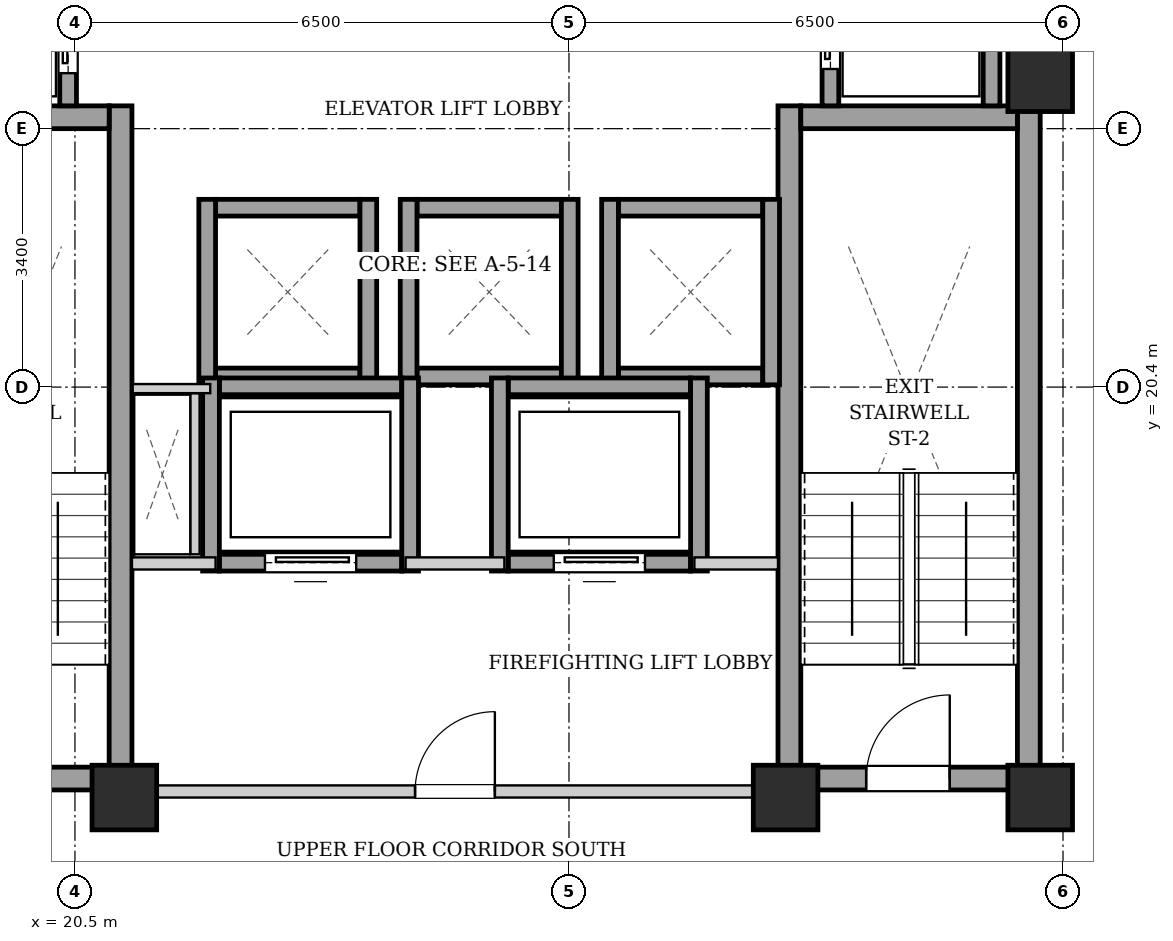
"""IFC4 building model, lengths in metres.
Left out: names, types, materials, properties, quantities, classifications, styles, units other than length and angle.
Written with IfcOpenShell. Run it as: python <this file> out.ifc"""

import sys

from ifc_helpers import new_model, si_unit, direction, frame, frame_2d, origin, origin_2d, place, context, subcontext, project, spatial, rectangle, extrude, element, fill, save


model = new_model("IFC4")
c1 = context("Model", 3, precision=1e-05, world=origin(), true_north=direction((0.0, 1.0)))
c2 = subcontext(c1, "Body", "Model", "MODEL_VIEW")
j1 = project(units=[si_unit("LENGTHUNIT", "METRE"), si_unit("PLANEANGLEUNIT", "RADIAN")], contexts=[c1])
p1 = place(None, origin())
s1 = spatial("IfcSite", under=j1, at=p1, CompositionType="ELEMENT")
p2 = place(p1, origin())
s2 = spatial("IfcBuilding", under=s1, at=p2, CompositionType="ELEMENT")
p3 = place(p2, frame((0.0, 0.0, 177.7)))
s3 = spatial("IfcBuildingStorey", under=s2, at=p3, CompositionType="ELEMENT", Elevation=177.7)
for number, where, z_axis, x_axis in (
    (1, (21.15, 15.0, 0.0), (0.0, 0.0, 1.0), (1.0, 0.0, 0.0)),
    (2, (29.85, 15.0, 0.0), (0.0, 0.0, 1.0), (1.0, 0.0, 0.0)),
    (3, (33.2, 15.0, 0.0), (0.0, 0.0, 1.0), (1.0, 0.0, 0.0)),
    (4, (33.2, 24.45, 0.0), (0.0, 0.0, 1.0), (1.0, 0.0, 0.0)),
):
    element("IfcColumn", number, at=place(p3, frame(where, z_axis=z_axis, x_axis=x_axis)), inside=s3, PredefinedType="COLUMN", context=c2, shape_type="SweptSolid", body=[
        extrude(rectangle(XDim=0.85, YDim=0.85, at=origin_2d()), origin(), (0.0, 0.0, 1.0), 3.3),
    ])
p4 = place(p3, frame((21.1, 15.1, 0.0), z_axis=(0.0, 0.0, 1.0), x_axis=(0.0, 1.0, 0.0)))
e5 = element("IfcWall", 5, at=p4, inside=s3, PredefinedType="SHEAR", context=c2, shape_type="SweptSolid", body=[
    extrude(rectangle(XDim=9.0, YDim=0.3, at=frame_2d((4.5, 0.0))), origin(), (0.0, 0.0, 1.0), 3.04),
])
p5 = place(p3, frame((18.1, 23.95, 0.0), z_axis=(0.0, 0.0, 1.0), x_axis=(1.0, 0.0, 0.0)))
e6 = element("IfcWall", 6, at=p5, inside=s3, PredefinedType="SHEAR", context=c2, shape_type="SweptSolid", body=[
    extrude(rectangle(XDim=2.85, YDim=0.3, at=frame_2d((1.425, 0.0))), origin(), (0.0, 0.0, 1.0), 3.04),
])
p6 = place(p3, frame((18.1, 15.25, 0.0), z_axis=(0.0, 0.0, 1.0), x_axis=(1.0, 0.0, 0.0)))
e7 = element("IfcWall", 7, at=p6, inside=s3, PredefinedType="SHEAR", context=c2, shape_type="SweptSolid", body=[
    extrude(rectangle(XDim=2.85, YDim=0.3, at=frame_2d((1.425, 0.0))), origin(), (0.0, 0.0, 1.0), 3.04),
])
p7 = place(p6, frame((0.86, 0.0, 0.0)))
e8 = element("IfcOpeningElement", 8, at=p7, cuts=e7, PredefinedType="OPENING", context=c2, shape_type="SweptSolid", body=[
    extrude(rectangle(XDim=1.1, YDim=2.05, at=frame_2d((0.55, 1.025))), frame((0.0, 0.16, 0.0), z_axis=(0.0, -1.0, 0.0), x_axis=(1.0, 0.0, 0.0)), (0.0, 0.0, 1.0), 0.32),
])
for number, where, z_axis, x_axis in (
    (9, (29.9, 15.1, 0.0), (0.0, 0.0, 1.0), (0.0, 1.0, 0.0)),
    (10, (33.05, 15.1, 0.0), (0.0, 0.0, 1.0), (0.0, 1.0, 0.0)),
):
    element("IfcWall", number, at=place(p3, frame(where, z_axis=z_axis, x_axis=x_axis)), inside=s3, PredefinedType="SHEAR", context=c2, shape_type="SweptSolid", body=[
        extrude(rectangle(XDim=9.0, YDim=0.3, at=frame_2d((4.5, 0.0))), origin(), (0.0, 0.0, 1.0), 3.04),
    ])
p8 = place(p3, frame((30.05, 23.95, 0.0), z_axis=(0.0, 0.0, 1.0), x_axis=(1.0, 0.0, 0.0)))
e11 = element("IfcWall", 11, at=p8, inside=s3, PredefinedType="SHEAR", context=c2, shape_type="SweptSolid", body=[
    extrude(rectangle(XDim=2.85, YDim=0.3, at=frame_2d((1.425, 0.0))), origin(), (0.0, 0.0, 1.0), 3.04),
])
p9 = place(p3, frame((30.05, 15.25, 0.0), z_axis=(0.0, 0.0, 1.0), x_axis=(1.0, 0.0, 0.0)))
e12 = element("IfcWall", 12, at=p9, inside=s3, PredefinedType="SHEAR", context=c2, shape_type="SweptSolid", body=[
    extrude(rectangle(XDim=2.85, YDim=0.3, at=frame_2d((1.425, 0.0))), origin(), (0.0, 0.0, 1.0), 3.04),
])
p10 = place(p9, frame((0.86, 0.0, 0.0)))
e13 = element("IfcOpeningElement", 13, at=p10, cuts=e12, PredefinedType="OPENING", context=c2, shape_type="SweptSolid", body=[
    extrude(rectangle(XDim=1.1, YDim=2.05, at=frame_2d((0.55, 1.025))), frame((0.0, 0.16, 0.0), z_axis=(0.0, -1.0, 0.0), x_axis=(1.0, 0.0, 0.0)), (0.0, 0.0, 1.0), 0.32),
])
for number, where, z_axis, x_axis in (
    (14, (22.35, 20.54, 0.0), (0.0, 0.0, 1.0), (1.0, 0.0, 0.0)),
    (15, (22.35, 22.76, 0.0), (0.0, 0.0, 1.0), (1.0, 0.0, 0.0)),
):
    element("IfcWall", number, at=place(p3, frame(where, z_axis=z_axis, x_axis=x_axis)), inside=s3, PredefinedType="SHEAR", context=c2, shape_type="SweptSolid", body=[
        extrude(rectangle(XDim=1.9, YDim=0.22, at=frame_2d((0.95, 0.0))), origin(), (0.0, 0.0, 1.0), 3.04),
    ])
for number, where, z_axis, x_axis in (
    (16, (22.24, 20.43, 0.0), (0.0, 0.0, 1.0), (0.0, 1.0, 0.0)),
    (17, (24.36, 20.43, 0.0), (0.0, 0.0, 1.0), (0.0, 1.0, 0.0)),
):
    element("IfcWall", number, at=place(p3, frame(where, z_axis=z_axis, x_axis=x_axis)), inside=s3, PredefinedType="SHEAR", context=c2, shape_type="SweptSolid", body=[
        extrude(rectangle(XDim=2.44, YDim=0.22, at=frame_2d((1.22, 0.0))), origin(), (0.0, 0.0, 1.0), 3.04),
    ])
for number, where, z_axis, x_axis in (
    (18, (25.0, 20.54, 0.0), (0.0, 0.0, 1.0), (1.0, 0.0, 0.0)),
    (19, (25.0, 22.76, 0.0), (0.0, 0.0, 1.0), (1.0, 0.0, 0.0)),
):
    element("IfcWall", number, at=place(p3, frame(where, z_axis=z_axis, x_axis=x_axis)), inside=s3, PredefinedType="SHEAR", context=c2, shape_type="SweptSolid", body=[
        extrude(rectangle(XDim=1.9, YDim=0.22, at=frame_2d((0.95, 0.0))), origin(), (0.0, 0.0, 1.0), 3.04),
    ])
for number, where, z_axis, x_axis in (
    (20, (24.89, 20.43, 0.0), (0.0, 0.0, 1.0), (0.0, 1.0, 0.0)),
    (21, (27.01, 20.43, 0.0), (0.0, 0.0, 1.0), (0.0, 1.0, 0.0)),
):
    element("IfcWall", number, at=place(p3, frame(where, z_axis=z_axis, x_axis=x_axis)), inside=s3, PredefinedType="SHEAR", context=c2, shape_type="SweptSolid", body=[
        extrude(rectangle(XDim=2.44, YDim=0.22, at=frame_2d((1.22, 0.0))), origin(), (0.0, 0.0, 1.0), 3.04),
    ])
for number, where, z_axis, x_axis in (
    (22, (27.65, 20.54, 0.0), (0.0, 0.0, 1.0), (1.0, 0.0, 0.0)),
    (23, (27.65, 22.76, 0.0), (0.0, 0.0, 1.0), (1.0, 0.0, 0.0)),
):
    element("IfcWall", number, at=place(p3, frame(where, z_axis=z_axis, x_axis=x_axis)), inside=s3, PredefinedType="SHEAR", context=c2, shape_type="SweptSolid", body=[
        extrude(rectangle(XDim=1.9, YDim=0.22, at=frame_2d((0.95, 0.0))), origin(), (0.0, 0.0, 1.0), 3.04),
    ])
for number, where, z_axis, x_axis in (
    (24, (27.54, 20.43, 0.0), (0.0, 0.0, 1.0), (0.0, 1.0, 0.0)),
    (25, (29.66, 20.43, 0.0), (0.0, 0.0, 1.0), (0.0, 1.0, 0.0)),
):
    element("IfcWall", number, at=place(p3, frame(where, z_axis=z_axis, x_axis=x_axis)), inside=s3, PredefinedType="SHEAR", context=c2, shape_type="SweptSolid", body=[
        extrude(rectangle(XDim=2.44, YDim=0.22, at=frame_2d((1.22, 0.0))), origin(), (0.0, 0.0, 1.0), 3.04),
    ])
p11 = place(p3, frame((20.41, 24.1, 0.0), z_axis=(0.0, 0.0, 1.0), x_axis=(0.0, 1.0, 0.0)))
e26 = element("IfcWall", 26, at=p11, inside=s3, PredefinedType="SHEAR", context=c2, shape_type="SweptSolid", body=[
    extrude(rectangle(XDim=1.96, YDim=0.22, at=frame_2d((0.98, 0.0))), origin(), (0.0, 0.0, 1.0), 3.04),
])
p12 = place(p11, frame((0.43, 0.0, 0.0)))
e27 = element("IfcOpeningElement", 27, at=p12, cuts=e26, PredefinedType="OPENING", context=c2, shape_type="SweptSolid", body=[
    extrude(rectangle(XDim=1.1, YDim=2.15, at=frame_2d((0.55, 1.075))), frame((0.0, 0.12, 0.0), z_axis=(0.0, -1.0, 0.0), x_axis=(1.0, 0.0, 0.0)), (0.0, 0.0, 1.0), 0.24),
])
p13 = place(p3, frame((30.44, 24.1, 0.0), z_axis=(0.0, 0.0, 1.0), x_axis=(0.0, 1.0, 0.0)))
e28 = element("IfcWall", 28, at=p13, inside=s3, PredefinedType="SHEAR", context=c2, shape_type="SweptSolid", body=[
    extrude(rectangle(XDim=2.07, YDim=0.22, at=frame_2d((1.035, 0.0))), origin(), (0.0, 0.0, 1.0), 3.04),
])
p14 = place(p13, frame((0.485, 0.0, 0.0)))
e29 = element("IfcOpeningElement", 29, at=p14, cuts=e28, PredefinedType="OPENING", context=c2, shape_type="SweptSolid", body=[
    extrude(rectangle(XDim=1.1, YDim=2.15, at=frame_2d((0.55, 1.075))), frame((0.0, 0.12, 0.0), z_axis=(0.0, -1.0, 0.0), x_axis=(1.0, 0.0, 0.0)), (0.0, 0.0, 1.0), 0.24),
])
p15 = place(p3, frame((32.56, 24.1, 0.0), z_axis=(0.0, 0.0, 1.0), x_axis=(0.0, 1.0, 0.0)))
e30 = element("IfcWall", 30, at=p15, inside=s3, PredefinedType="SHEAR", context=c2, shape_type="SweptSolid", body=[
    extrude(rectangle(XDim=2.07, YDim=0.22, at=frame_2d((1.035, 0.0))), origin(), (0.0, 0.0, 1.0), 3.04),
])
p16 = place(p3, frame((22.4, 18.09, 0.0), z_axis=(0.0, 0.0, 1.0), x_axis=(1.0, 0.0, 0.0)))
e31 = element("IfcWall", 31, at=p16, inside=s3, PredefinedType="SHEAR", context=c2, shape_type="SweptSolid", body=[
    extrude(rectangle(XDim=2.4, YDim=0.22, at=frame_2d((1.2, 0.0))), origin(), (0.0, 0.0, 1.0), 3.04),
])
p17 = place(p16, frame((0.6, 0.0, 0.0)))
e32 = element("IfcOpeningElement", 32, at=p17, cuts=e31, PredefinedType="OPENING", context=c2, shape_type="SweptSolid", body=[
    extrude(rectangle(XDim=1.2, YDim=2.15, at=frame_2d((0.6, 1.075))), frame((0.0, 0.12, 0.0), z_axis=(0.0, -1.0, 0.0), x_axis=(1.0, 0.0, 0.0)), (0.0, 0.0, 1.0), 0.24),
])
p18 = place(p3, frame((22.4, 20.41, 0.0), z_axis=(0.0, 0.0, 1.0), x_axis=(1.0, 0.0, 0.0)))
e33 = element("IfcWall", 33, at=p18, inside=s3, PredefinedType="SHEAR", context=c2, shape_type="SweptSolid", body=[
    extrude(rectangle(XDim=2.4, YDim=0.22, at=frame_2d((1.2, 0.0))), origin(), (0.0, 0.0, 1.0), 3.04),
])
for number, where, z_axis, x_axis in (
    (34, (22.29, 17.98, 0.0), (0.0, 0.0, 1.0), (0.0, 1.0, 0.0)),
    (35, (24.91, 17.98, 0.0), (0.0, 0.0, 1.0), (0.0, 1.0, 0.0)),
):
    element("IfcWall", number, at=place(p3, frame(where, z_axis=z_axis, x_axis=x_axis)), inside=s3, PredefinedType="SHEAR", context=c2, shape_type="SweptSolid", body=[
        extrude(rectangle(XDim=2.54, YDim=0.22, at=frame_2d((1.27, 0.0))), origin(), (0.0, 0.0, 1.0), 3.04),
    ])
p19 = place(p3, frame((26.2, 18.09, 0.0), z_axis=(0.0, 0.0, 1.0), x_axis=(1.0, 0.0, 0.0)))
e36 = element("IfcWall", 36, at=p19, inside=s3, PredefinedType="SHEAR", context=c2, shape_type="SweptSolid", body=[
    extrude(rectangle(XDim=2.4, YDim=0.22, at=frame_2d((1.2, 0.0))), origin(), (0.0, 0.0, 1.0), 3.04),
])
p20 = place(p19, frame((0.6, 0.0, 0.0)))
e37 = element("IfcOpeningElement", 37, at=p20, cuts=e36, PredefinedType="OPENING", context=c2, shape_type="SweptSolid", body=[
    extrude(rectangle(XDim=1.2, YDim=2.15, at=frame_2d((0.6, 1.075))), frame((0.0, 0.12, 0.0), z_axis=(0.0, -1.0, 0.0), x_axis=(1.0, 0.0, 0.0)), (0.0, 0.0, 1.0), 0.24),
])
p21 = place(p3, frame((26.2, 20.41, 0.0), z_axis=(0.0, 0.0, 1.0), x_axis=(1.0, 0.0, 0.0)))
e38 = element("IfcWall", 38, at=p21, inside=s3, PredefinedType="SHEAR", context=c2, shape_type="SweptSolid", body=[
    extrude(rectangle(XDim=2.4, YDim=0.22, at=frame_2d((1.2, 0.0))), origin(), (0.0, 0.0, 1.0), 3.04),
])
for number, where, z_axis, x_axis in (
    (39, (26.09, 17.98, 0.0), (0.0, 0.0, 1.0), (0.0, 1.0, 0.0)),
    (40, (28.71, 17.98, 0.0), (0.0, 0.0, 1.0), (0.0, 1.0, 0.0)),
):
    element("IfcWall", number, at=place(p3, frame(where, z_axis=z_axis, x_axis=x_axis)), inside=s3, PredefinedType="SHEAR", context=c2, shape_type="SweptSolid", body=[
        extrude(rectangle(XDim=2.54, YDim=0.22, at=frame_2d((1.27, 0.0))), origin(), (0.0, 0.0, 1.0), 3.04),
    ])
p22 = place(p3, frame((21.25, 15.08, 0.0), z_axis=(0.0, 0.0, 1.0), x_axis=(1.0, 0.0, 0.0)))
e41 = element("IfcWall", 41, at=p22, inside=s3, PredefinedType="PARTITIONING", context=c2, shape_type="SweptSolid", body=[
    extrude(rectangle(XDim=8.5, YDim=0.16, at=frame_2d((4.25, 0.0))), origin(), (0.0, 0.0, 1.0), 2.556),
])
p23 = place(p22, frame((3.725, 0.0, 0.0)))
e42 = element("IfcOpeningElement", 42, at=p23, cuts=e41, PredefinedType="OPENING", context=c2, shape_type="SweptSolid", body=[
    extrude(rectangle(XDim=1.05, YDim=2.05, at=frame_2d((0.525, 1.025))), frame((0.0, 0.09, 0.0), z_axis=(0.0, -1.0, 0.0), x_axis=(1.0, 0.0, 0.0)), (0.0, 0.0, 1.0), 0.18),
])
p24 = place(p3, frame((21.25, 18.08, 0.0), z_axis=(0.0, 0.0, 1.0), x_axis=(1.0, 0.0, 0.0)))
e43 = element("IfcWall", 43, at=p24, inside=s3, PredefinedType="PARTITIONING", context=c2, shape_type="SweptSolid", body=[
    extrude(rectangle(XDim=1.1, YDim=0.16, at=frame_2d((0.55, 0.0))), origin(), (0.0, 0.0, 1.0), 3.04),
])
p25 = place(p3, frame((24.85, 18.08, 0.0), z_axis=(0.0, 0.0, 1.0), x_axis=(1.0, 0.0, 0.0)))
e44 = element("IfcWall", 44, at=p25, inside=s3, PredefinedType="PARTITIONING", context=c2, shape_type="SweptSolid", body=[
    extrude(rectangle(XDim=1.3, YDim=0.16, at=frame_2d((0.65, 0.0))), origin(), (0.0, 0.0, 1.0), 3.04),
])
p26 = place(p3, frame((28.65, 18.08, 0.0), z_axis=(0.0, 0.0, 1.0), x_axis=(1.0, 0.0, 0.0)))
e45 = element("IfcWall", 45, at=p26, inside=s3, PredefinedType="PARTITIONING", context=c2, shape_type="SweptSolid", body=[
    extrude(rectangle(XDim=1.1, YDim=0.16, at=frame_2d((0.55, 0.0))), origin(), (0.0, 0.0, 1.0), 3.04),
])
p27 = place(p3, frame((33.12, 24.12, 0.0), z_axis=(0.0, 0.0, 1.0), x_axis=(0.0, 1.0, 0.0)))
e46 = element("IfcWall", 46, at=p27, inside=s3, PredefinedType="PARTITIONING", context=c2, shape_type="SweptSolid", body=[
    extrude(rectangle(XDim=4.76, YDim=0.16, at=frame_2d((2.38, 0.0))), origin(), (0.0, 0.0, 1.0), 2.375),
])
p28 = place(p3, frame((22.08, 18.2, 0.0), z_axis=(0.0, 0.0, 1.0), x_axis=(0.0, 1.0, 0.0)))
e47 = element("IfcWall", 47, at=p28, inside=s3, PredefinedType="PARTITIONING", context=c2, shape_type="SweptSolid", body=[
    extrude(rectangle(XDim=2.12, YDim=0.12, at=frame_2d((1.06, 0.0))), origin(), (0.0, 0.0, 1.0), 3.04),
])
p29 = place(p3, frame((22.28, 20.38, 0.0), z_axis=(0.0, 0.0, 1.0), x_axis=(-1.0, 0.0, 0.0)))
e48 = element("IfcWall", 48, at=p29, inside=s3, PredefinedType="PARTITIONING", context=c2, shape_type="SweptSolid", body=[
    extrude(rectangle(XDim=1.02, YDim=0.12, at=frame_2d((0.51, 0.0))), origin(), (0.0, 0.0, 1.0), 3.04),
])
p30 = place(p10, origin())
e49 = element("IfcDoor", 49, at=p30, inside=s3, OperationType="SINGLE_SWING_RIGHT", PredefinedType="DOOR", context=c2, shape_type="SweptSolid", body=[
    extrude(rectangle(XDim=1.1, YDim=2.05, at=frame_2d((0.55, 1.025))), frame((0.0, 0.025, 0.0), z_axis=(0.0, -1.0, 0.0), x_axis=(1.0, 0.0, 0.0)), (0.0, 0.0, 1.0), 0.05),
])
fill(e13, e49)
p31 = place(p12, origin())
e50 = element("IfcDoor", 50, at=p31, inside=s3, OperationType="SLIDING_TO_LEFT", PredefinedType="DOOR", context=c2, shape_type="SweptSolid", body=[
    extrude(rectangle(XDim=1.1, YDim=2.15, at=frame_2d((0.55, 1.075))), frame((0.0, 0.025, 0.0), z_axis=(0.0, -1.0, 0.0), x_axis=(1.0, 0.0, 0.0)), (0.0, 0.0, 1.0), 0.05),
])
fill(e27, e50)
p32 = place(p14, origin())
e51 = element("IfcDoor", 51, at=p32, inside=s3, OperationType="SLIDING_TO_LEFT", PredefinedType="DOOR", context=c2, shape_type="SweptSolid", body=[
    extrude(rectangle(XDim=1.1, YDim=2.15, at=frame_2d((0.55, 1.075))), frame((0.0, 0.025, 0.0), z_axis=(0.0, -1.0, 0.0), x_axis=(1.0, 0.0, 0.0)), (0.0, 0.0, 1.0), 0.05),
])
fill(e29, e51)
p33 = place(p17, origin())
e52 = element("IfcDoor", 52, at=p33, inside=s3, OperationType="SLIDING_TO_LEFT", PredefinedType="DOOR", context=c2, shape_type="SweptSolid", body=[
    extrude(rectangle(XDim=1.2, YDim=2.15, at=frame_2d((0.6, 1.075))), frame((0.0, 0.025, 0.0), z_axis=(0.0, -1.0, 0.0), x_axis=(1.0, 0.0, 0.0)), (0.0, 0.0, 1.0), 0.05),
])
fill(e32, e52)
p34 = place(p20, origin())
e53 = element("IfcDoor", 53, at=p34, inside=s3, OperationType="SLIDING_TO_LEFT", PredefinedType="DOOR", context=c2, shape_type="SweptSolid", body=[
    extrude(rectangle(XDim=1.2, YDim=2.15, at=frame_2d((0.6, 1.075))), frame((0.0, 0.025, 0.0), z_axis=(0.0, -1.0, 0.0), x_axis=(1.0, 0.0, 0.0)), (0.0, 0.0, 1.0), 0.05),
])
fill(e37, e53)
p35 = place(p23, origin())
e54 = element("IfcDoor", 54, at=p35, inside=s3, OperationType="SINGLE_SWING_RIGHT", PredefinedType="DOOR", context=c2, shape_type="SweptSolid", body=[
    extrude(rectangle(XDim=1.05, YDim=2.05, at=frame_2d((0.525, 1.025))), frame((0.0, 0.025, 0.0), z_axis=(0.0, -1.0, 0.0), x_axis=(1.0, 0.0, 0.0)), (0.0, 0.0, 1.0), 0.05),
])
fill(e42, e54)
save(model, sys.argv[1])
